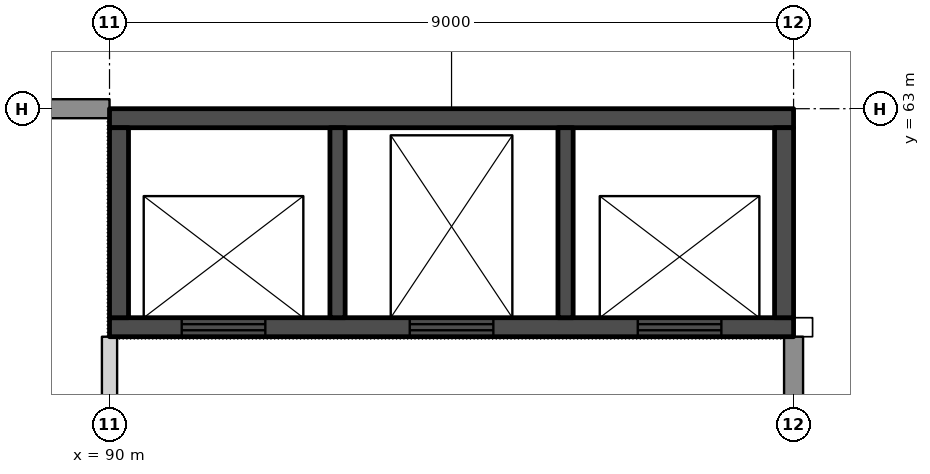
"""IFC4 building model, lengths in metres.
Left out: names, types, materials, properties, quantities, classifications, styles, units other than length and angle.
Written with IfcOpenShell. Run it as: python <this file> out.ifc"""

import sys

from ifc_helpers import new_model, si_unit, direction, frame, frame_2d, origin, place, context, subcontext, project, spatial, rectangle, extrude, element, fill, save


model = new_model("IFC4")
c1 = context("Model", 3, precision=1e-05, world=origin(), true_north=direction((0.0, 1.0)))
c2 = subcontext(c1, "Body", "Model", "MODEL_VIEW")
j1 = project(units=[si_unit("LENGTHUNIT", "METRE"), si_unit("PLANEANGLEUNIT", "RADIAN")], contexts=[c1])
p1 = place(None, origin())
s1 = spatial("IfcSite", under=j1, at=p1, CompositionType="ELEMENT")
p2 = place(p1, origin())
s2 = spatial("IfcBuilding", under=s1, at=p2, CompositionType="ELEMENT")
p3 = place(p2, frame((0.0, 0.0, 33.5)))
s3 = spatial("IfcBuildingStorey", under=s2, at=p3, CompositionType="ELEMENT", Elevation=33.5)
p4 = place(p3, frame((90.0, 54.35, 0.0), z_axis=(0.0, 0.0, 1.0), x_axis=(0.0, 1.0, 0.0)))
e1 = element("IfcWall", 1, at=p4, inside=s3, PredefinedType="PARTITIONING", context=c2, shape_type="SweptSolid", body=[
    extrude(rectangle(XDim=5.65, YDim=0.2, at=frame_2d((2.825, 0.0))), origin(), (0.0, 0.0, 1.0), 4.0),
])
p5 = place(p3, frame((90.0, 60.125, 0.0), z_axis=(0.0, 0.0, 1.0), x_axis=(1.0, 0.0, 0.0)))
e2 = element("IfcWall", 2, at=p5, inside=s3, PredefinedType="SHEAR", context=c2, shape_type="SweptSolid", body=[
    extrude(rectangle(XDim=9.0, YDim=0.25, at=frame_2d((4.5, 0.0))), origin(), (0.0, 0.0, 1.0), 4.0),
])
p6 = place(p5, frame((0.95, 0.0, 0.0)))
e3 = element("IfcOpeningElement", 3, at=p6, cuts=e2, PredefinedType="OPENING", context=c2, shape_type="SweptSolid", body=[
    extrude(rectangle(XDim=1.1, YDim=2.1, at=frame_2d((0.55, 1.05))), frame((0.0, 0.135, 0.0), z_axis=(0.0, -1.0, 0.0), x_axis=(1.0, 0.0, 0.0)), (0.0, 0.0, 1.0), 0.27),
])
p7 = place(p5, frame((3.95, 0.0, 0.0)))
e4 = element("IfcOpeningElement", 4, at=p7, cuts=e2, PredefinedType="OPENING", context=c2, shape_type="SweptSolid", body=[
    extrude(rectangle(XDim=1.1, YDim=2.1, at=frame_2d((0.55, 1.05))), frame((0.0, 0.135, 0.0), z_axis=(0.0, -1.0, 0.0), x_axis=(1.0, 0.0, 0.0)), (0.0, 0.0, 1.0), 0.27),
])
p8 = place(p5, frame((6.95, 0.0, 0.0)))
e5 = element("IfcOpeningElement", 5, at=p8, cuts=e2, PredefinedType="OPENING", context=c2, shape_type="SweptSolid", body=[
    extrude(rectangle(XDim=1.1, YDim=2.1, at=frame_2d((0.55, 1.05))), frame((0.0, 0.135, 0.0), z_axis=(0.0, -1.0, 0.0), x_axis=(1.0, 0.0, 0.0)), (0.0, 0.0, 1.0), 0.27),
])
p9 = place(p3, frame((90.0, 62.875, 0.0), z_axis=(0.0, 0.0, 1.0), x_axis=(1.0, 0.0, 0.0)))
e6 = element("IfcWall", 6, at=p9, inside=s3, PredefinedType="SHEAR", context=c2, shape_type="SweptSolid", body=[
    extrude(rectangle(XDim=9.0, YDim=0.25, at=frame_2d((4.5, 0.0))), origin(), (0.0, 0.0, 1.0), 4.0),
])
for number, where, z_axis, x_axis in (
    (7, (90.125, 60.25, 0.0), (0.0, 0.0, 1.0), (0.0, 1.0, 0.0)),
    (8, (98.875, 60.25, 0.0), (0.0, 0.0, 1.0), (0.0, 1.0, 0.0)),
):
    element("IfcWall", number, at=place(p3, frame(where, z_axis=z_axis, x_axis=x_axis)), inside=s3, PredefinedType="SHEAR", context=c2, shape_type="SweptSolid", body=[
        extrude(rectangle(XDim=2.5, YDim=0.25, at=frame_2d((1.25, 0.0))), origin(), (0.0, 0.0, 1.0), 4.0),
    ])
for number, where, z_axis, x_axis in (
    (9, (93.0, 60.25, 0.0), (0.0, 0.0, 1.0), (0.0, 1.0, 0.0)),
    (10, (96.0, 60.25, 0.0), (0.0, 0.0, 1.0), (0.0, 1.0, 0.0)),
):
    element("IfcWall", number, at=place(p3, frame(where, z_axis=z_axis, x_axis=x_axis)), inside=s3, PredefinedType="SHEAR", context=c2, shape_type="SweptSolid", body=[
        extrude(rectangle(XDim=2.5, YDim=0.2, at=frame_2d((1.25, 0.0))), origin(), (0.0, 0.0, 1.0), 4.0),
    ])
p10 = place(p3, frame((99.0, 54.35, 0.0), z_axis=(0.0, 0.0, 1.0), x_axis=(0.0, 1.0, 0.0)))
e11 = element("IfcWall", 11, at=p10, inside=s3, PredefinedType="SOLIDWALL", context=c2, shape_type="SweptSolid", body=[
    extrude(rectangle(XDim=5.65, YDim=0.25, at=frame_2d((2.825, 0.0))), origin(), (0.0, 0.0, 1.0), 4.0),
])
p11 = place(p3, frame((81.0, 63.0, 0.0), z_axis=(0.0, 0.0, 1.0), x_axis=(1.0, 0.0, 0.0)))
e12 = element("IfcWall", 12, at=p11, inside=s3, PredefinedType="SOLIDWALL", context=c2, shape_type="SweptSolid", body=[
    extrude(rectangle(XDim=9.0, YDim=0.25, at=frame_2d((4.5, 0.0))), origin(), (0.0, 0.0, 1.0), 4.0),
])
p12 = place(p6, origin())
e13 = element("IfcDoor", 13, at=p12, inside=s3, OperationType="DOUBLE_DOOR_SLIDING", PredefinedType="DOOR", context=c2, shape_type="SweptSolid", body=[
    extrude(rectangle(XDim=1.1, YDim=2.1, at=frame_2d((0.55, 1.05))), frame((0.0, 0.025, 0.0), z_axis=(0.0, -1.0, 0.0), x_axis=(1.0, 0.0, 0.0)), (0.0, 0.0, 1.0), 0.05),
])
fill(e3, e13)
p13 = place(p7, origin())
e14 = element("IfcDoor", 14, at=p13, inside=s3, OperationType="DOUBLE_DOOR_SLIDING", PredefinedType="DOOR", context=c2, shape_type="SweptSolid", body=[
    extrude(rectangle(XDim=1.1, YDim=2.1, at=frame_2d((0.55, 1.05))), frame((0.0, 0.025, 0.0), z_axis=(0.0, -1.0, 0.0), x_axis=(1.0, 0.0, 0.0)), (0.0, 0.0, 1.0), 0.05),
])
fill(e4, e14)
p14 = place(p8, origin())
e15 = element("IfcDoor", 15, at=p14, inside=s3, OperationType="DOUBLE_DOOR_SLIDING", PredefinedType="DOOR", context=c2, shape_type="SweptSolid", body=[
    extrude(rectangle(XDim=1.1, YDim=2.1, at=frame_2d((0.55, 1.05))), frame((0.0, 0.025, 0.0), z_axis=(0.0, -1.0, 0.0), x_axis=(1.0, 0.0, 0.0)), (0.0, 0.0, 1.0), 0.05),
])
fill(e5, e15)
save(model, sys.argv[1])
